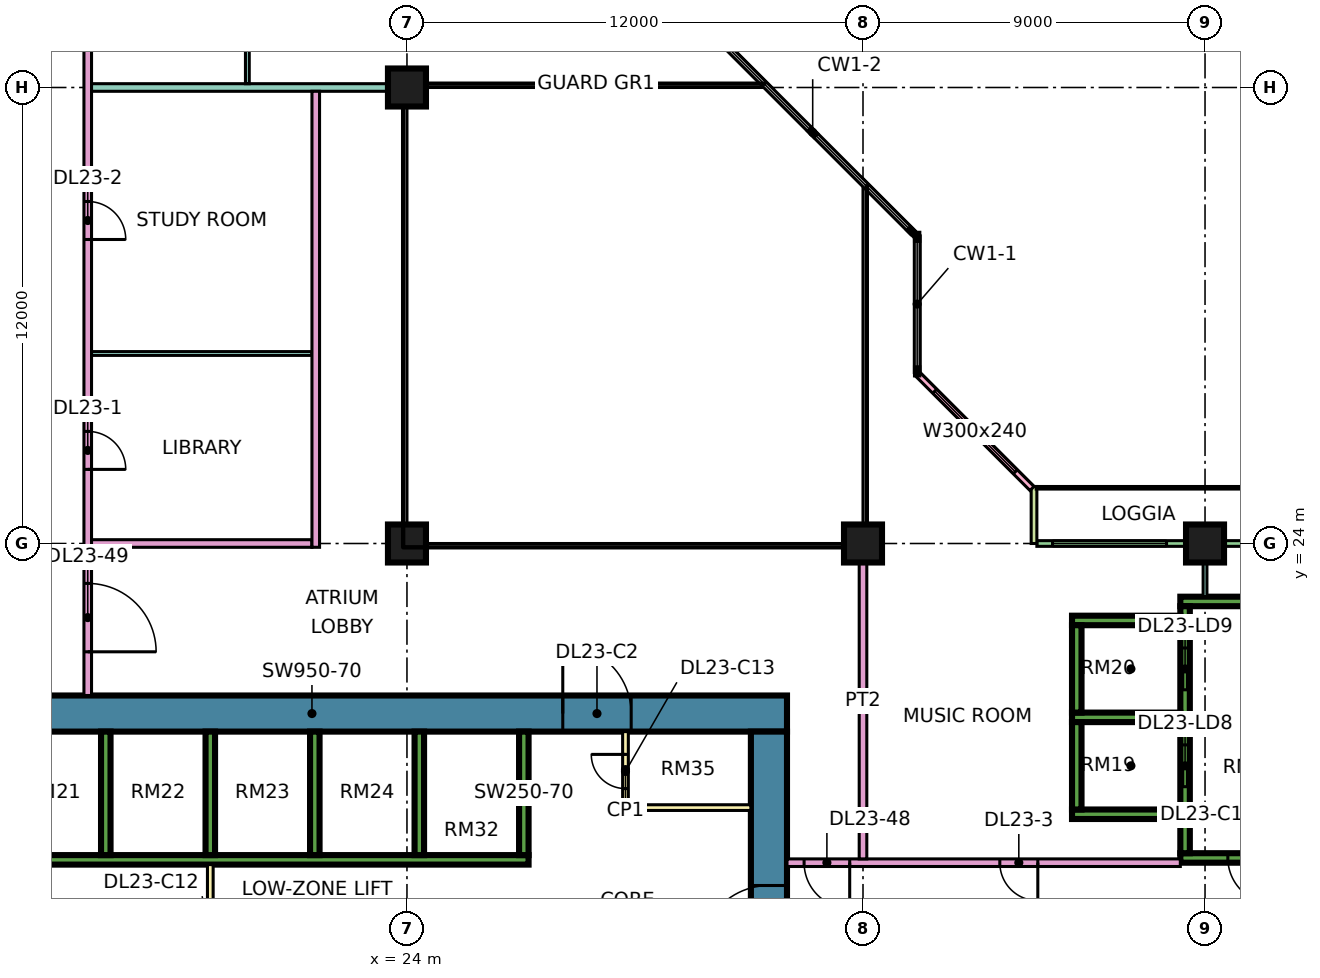
"""IFC4 building model, lengths in metres.
Left out: names, types, materials, properties, quantities, classifications, styles, units other than length and angle.
Written with IfcOpenShell. Run it as: python <this file> out.ifc"""

import sys

from ifc_helpers import new_model, si_unit, direction, frame, frame_2d, origin, origin_2d, place, context, subcontext, project, spatial, rectangle, extrude, element, fill, save


model = new_model("IFC4")
c1 = context("Model", 3, precision=1e-05, world=origin(), true_north=direction((0.0, 1.0)))
c2 = subcontext(c1, "Body", "Model", "MODEL_VIEW")
j1 = project(units=[si_unit("LENGTHUNIT", "METRE"), si_unit("PLANEANGLEUNIT", "RADIAN")], contexts=[c1])
p1 = place(None, origin())
s1 = spatial("IfcSite", under=j1, at=p1, CompositionType="ELEMENT")
p2 = place(p1, origin())
s2 = spatial("IfcBuilding", under=s1, at=p2, CompositionType="ELEMENT")
p3 = place(p2, frame((0.0, 0.0, 103.15)))
s3 = spatial("IfcBuildingStorey", under=s2, at=p3, CompositionType="ELEMENT", Elevation=103.15)
for number, where, z_axis, x_axis in (
    (1, (24.0, 24.0, 0.0), (0.0, 0.0, 1.0), (1.0, 0.0, 0.0)),
    (2, (24.0, 36.0, 0.0), (0.0, 0.0, 1.0), (1.0, 0.0, 0.0)),
    (3, (36.0, 24.0, 0.0), (0.0, 0.0, 1.0), (1.0, 0.0, 0.0)),
    (4, (45.0, 24.0, 0.0), (0.0, 0.0, 1.0), (1.0, 0.0, 0.0)),
):
    element("IfcColumn", number, at=place(p3, frame(where, z_axis=z_axis, x_axis=x_axis)), inside=s3, PredefinedType="COLUMN", context=c2, shape_type="SweptSolid", body=[
        extrude(rectangle(XDim=1.0, YDim=1.0, at=origin_2d()), origin(), (0.0, 0.0, 1.0), 3.75),
    ])
p4 = place(p3, frame((9.0, 19.525, 0.0), z_axis=(0.0, 0.0, 1.0), x_axis=(1.0, 0.0, 0.0)))
e5 = element("IfcWall", 5, at=p4, inside=s3, PredefinedType="SHEAR", context=c2, shape_type="SweptSolid", body=[
    extrude(rectangle(XDim=25.0, YDim=0.95, at=frame_2d((12.5, 0.0))), origin(), (0.0, 0.0, 1.0), 3.75),
])
p5 = place(p4, frame((19.1, 0.0, 0.0)))
e6 = element("IfcOpeningElement", 6, at=p5, cuts=e5, PredefinedType="OPENING", context=c2, shape_type="SweptSolid", body=[
    extrude(rectangle(XDim=1.8, YDim=2.4, at=frame_2d((0.9, 1.2))), frame((0.0, 0.485, 0.0), z_axis=(0.0, -1.0, 0.0), x_axis=(1.0, 0.0, 0.0)), (0.0, 0.0, 1.0), 0.97),
])
p6 = place(p3, frame((33.525, 7.95, 0.0), z_axis=(0.0, 0.0, 1.0), x_axis=(0.0, 1.0, 0.0)))
e7 = element("IfcWall", 7, at=p6, inside=s3, PredefinedType="SHEAR", context=c2, shape_type="SweptSolid", body=[
    extrude(rectangle(XDim=11.1, YDim=0.95, at=frame_2d((5.55, 0.0))), origin(), (0.0, 0.0, 1.0), 3.75),
])
p7 = place(p6, frame((5.25, 0.0, 0.0)))
e8 = element("IfcOpeningElement", 8, at=p7, cuts=e7, PredefinedType="OPENING", context=c2, shape_type="SweptSolid", body=[
    extrude(rectangle(XDim=1.8, YDim=2.4, at=frame_2d((0.9, 1.2))), frame((0.0, 0.485, 0.0), z_axis=(0.0, -1.0, 0.0), x_axis=(1.0, 0.0, 0.0)), (0.0, 0.0, 1.0), 0.97),
])
p8 = place(p3, frame((13.45, 15.675, 0.0), z_axis=(0.0, 0.0, 1.0), x_axis=(1.0, 0.0, 0.0)))
e9 = element("IfcWall", 9, at=p8, inside=s3, PredefinedType="SHEAR", context=c2, shape_type="SweptSolid", body=[
    extrude(rectangle(XDim=13.75, YDim=0.25, at=frame_2d((6.875, 0.0))), origin(), (0.0, 0.0, 1.0), 3.75),
])
for number, where, z_axis, x_axis in (
    (10, (16.075, 15.8, 0.0), (0.0, 0.0, 1.0), (0.0, 1.0, 0.0)),
    (11, (18.825, 15.8, 0.0), (0.0, 0.0, 1.0), (0.0, 1.0, 0.0)),
    (12, (21.575, 15.8, 0.0), (0.0, 0.0, 1.0), (0.0, 1.0, 0.0)),
    (13, (24.325, 15.8, 0.0), (0.0, 0.0, 1.0), (0.0, 1.0, 0.0)),
    (14, (27.075, 15.8, 0.0), (0.0, 0.0, 1.0), (0.0, 1.0, 0.0)),
):
    element("IfcWall", number, at=place(p3, frame(where, z_axis=z_axis, x_axis=x_axis)), inside=s3, PredefinedType="SHEAR", context=c2, shape_type="SweptSolid", body=[
        extrude(rectangle(XDim=3.25, YDim=0.25, at=frame_2d((1.625, 0.0))), origin(), (0.0, 0.0, 1.0), 3.75),
    ])
p9 = place(p3, frame((44.35, 15.725, 0.0), z_axis=(0.0, 0.0, 1.0), x_axis=(1.0, 0.0, 0.0)))
e15 = element("IfcWall", 15, at=p9, inside=s3, PredefinedType="SHEAR", context=c2, shape_type="SweptSolid", body=[
    extrude(rectangle(XDim=3.425, YDim=0.25, at=frame_2d((1.712, 0.0))), origin(), (0.0, 0.0, 1.0), 3.75),
])
p10 = place(p9, frame((1.25, 0.0, 0.0)))
e16 = element("IfcOpeningElement", 16, at=p10, cuts=e15, PredefinedType="OPENING", context=c2, shape_type="SweptSolid", body=[
    extrude(rectangle(XDim=1.2, YDim=2.2, at=frame_2d((0.6, 1.1))), frame((0.0, 0.135, 0.0), z_axis=(0.0, -1.0, 0.0), x_axis=(1.0, 0.0, 0.0)), (0.0, 0.0, 1.0), 0.27),
])
p11 = place(p3, frame((44.35, 22.475, 0.0), z_axis=(0.0, 0.0, 1.0), x_axis=(1.0, 0.0, 0.0)))
e17 = element("IfcWall", 17, at=p11, inside=s3, PredefinedType="SHEAR", context=c2, shape_type="SweptSolid", body=[
    extrude(rectangle(XDim=3.425, YDim=0.25, at=frame_2d((1.712, 0.0))), origin(), (0.0, 0.0, 1.0), 3.75),
])
p12 = place(p3, frame((44.475, 15.85, 0.0), z_axis=(0.0, 0.0, 1.0), x_axis=(0.0, 1.0, 0.0)))
e18 = element("IfcWall", 18, at=p12, inside=s3, PredefinedType="SHEAR", context=c2, shape_type="SweptSolid", body=[
    extrude(rectangle(XDim=6.5, YDim=0.25, at=frame_2d((3.25, 0.0))), origin(), (0.0, 0.0, 1.0), 3.75),
])
p13 = place(p12, frame((1.75, 0.0, 0.0)))
e19 = element("IfcOpeningElement", 19, at=p13, cuts=e18, PredefinedType="OPENING", context=c2, shape_type="SweptSolid", body=[
    extrude(rectangle(XDim=1.1, YDim=2.2, at=frame_2d((0.55, 1.1))), frame((0.0, 0.135, 0.0), z_axis=(0.0, -1.0, 0.0), x_axis=(1.0, 0.0, 0.0)), (0.0, 0.0, 1.0), 0.27),
])
p14 = place(p12, frame((4.3, 0.0, 0.0)))
e20 = element("IfcOpeningElement", 20, at=p14, cuts=e18, PredefinedType="OPENING", context=c2, shape_type="SweptSolid", body=[
    extrude(rectangle(XDim=1.1, YDim=2.2, at=frame_2d((0.55, 1.1))), frame((0.0, 0.135, 0.0), z_axis=(0.0, -1.0, 0.0), x_axis=(1.0, 0.0, 0.0)), (0.0, 0.0, 1.0), 0.27),
])
for number, where, z_axis, x_axis in (
    (21, (41.5, 16.875, 0.0), (0.0, 0.0, 1.0), (1.0, 0.0, 0.0)),
    (22, (41.5, 19.425, 0.0), (0.0, 0.0, 1.0), (1.0, 0.0, 0.0)),
    (23, (41.5, 21.975, 0.0), (0.0, 0.0, 1.0), (1.0, 0.0, 0.0)),
):
    element("IfcWall", number, at=place(p3, frame(where, z_axis=z_axis, x_axis=x_axis)), inside=s3, PredefinedType="SHEAR", context=c2, shape_type="SweptSolid", body=[
        extrude(rectangle(XDim=2.85, YDim=0.25, at=frame_2d((1.425, 0.0))), origin(), (0.0, 0.0, 1.0), 3.75),
    ])
for number, where, z_axis, x_axis in (
    (24, (41.625, 17.0, 0.0), (0.0, 0.0, 1.0), (0.0, 1.0, 0.0)),
    (25, (41.625, 19.55, 0.0), (0.0, 0.0, 1.0), (0.0, 1.0, 0.0)),
):
    element("IfcWall", number, at=place(p3, frame(where, z_axis=z_axis, x_axis=x_axis)), inside=s3, PredefinedType="SHEAR", context=c2, shape_type="SweptSolid", body=[
        extrude(rectangle(XDim=2.3, YDim=0.25, at=frame_2d((1.15, 0.0))), origin(), (0.0, 0.0, 1.0), 3.75),
    ])
p15 = place(p3, frame((47.925, 24.0, 0.0), z_axis=(0.0, 0.0, 1.0), x_axis=(-1.0, 0.0, 0.0)))
e26 = element("IfcWall", 26, at=p15, inside=s3, PredefinedType="SOLIDWALL", context=c2, shape_type="SweptSolid", body=[
    extrude(rectangle(XDim=7.35, YDim=0.15, at=frame_2d((3.675, 0.0))), origin(), (0.0, 0.0, 1.0), 3.35),
])
p16 = place(p15, frame((0.562, 0.0, 0.45)))
e27 = element("IfcOpeningElement", 27, at=p16, cuts=e26, PredefinedType="OPENING", context=c2, shape_type="SweptSolid", body=[
    extrude(rectangle(XDim=1.2, YDim=2.4, at=frame_2d((0.6, 1.2))), frame((0.0, 0.085, 0.0), z_axis=(0.0, -1.0, 0.0), x_axis=(1.0, 0.0, 0.0)), (0.0, 0.0, 1.0), 0.17),
])
p17 = place(p15, frame((3.938, 0.0, 0.45)))
e28 = element("IfcOpeningElement", 28, at=p17, cuts=e26, PredefinedType="OPENING", context=c2, shape_type="SweptSolid", body=[
    extrude(rectangle(XDim=3.0, YDim=2.4, at=frame_2d((1.5, 1.2))), frame((0.0, 0.085, 0.0), z_axis=(0.0, -1.0, 0.0), x_axis=(1.0, 0.0, 0.0)), (0.0, 0.0, 1.0), 0.17),
])
p18 = place(p3, frame((40.5, 25.5, 0.0), z_axis=(0.0, 0.0, 1.0), x_axis=(0.0, -1.0, 0.0)))
e29 = element("IfcWall", 29, at=p18, inside=s3, PredefinedType="SOLIDWALL", context=c2, shape_type="SweptSolid", body=[
    extrude(rectangle(XDim=1.5, YDim=0.15, at=frame_2d((0.75, 0.0))), origin(), (0.0, 0.0, 1.0), 3.35),
])
p19 = place(p3, frame((40.447, 25.447, 0.0), z_axis=(0.0, 0.0, 1.0), x_axis=(-0.707106781187, 0.707106781187, 0.0)))
e30 = element("IfcWall", 30, at=p19, inside=s3, PredefinedType="SOLIDWALL", context=c2, shape_type="SweptSolid", body=[
    extrude(rectangle(XDim=4.243, YDim=0.15, at=frame_2d((2.121, 0.0))), origin(), (0.0, 0.0, 1.0), 3.35),
])
p20 = place(p19, frame((0.621, 0.0, 0.45)))
e31 = element("IfcOpeningElement", 31, at=p20, cuts=e30, PredefinedType="OPENING", context=c2, shape_type="SweptSolid", body=[
    extrude(rectangle(XDim=3.0, YDim=2.4, at=frame_2d((1.5, 1.2))), frame((0.0, 0.085, 0.0), z_axis=(0.0, -1.0, 0.0), x_axis=(1.0, 0.0, 0.0)), (0.0, 0.0, 1.0), 0.17),
])
p21 = place(p3, frame((18.825, 11.45, 0.0), z_axis=(0.0, 0.0, 1.0), x_axis=(0.0, 1.0, 0.0)))
e32 = element("IfcWall", 32, at=p21, inside=s3, PredefinedType="PARTITIONING", context=c2, shape_type="SweptSolid", body=[
    extrude(rectangle(XDim=4.1, YDim=0.15, at=frame_2d((2.05, 0.0))), origin(), (0.0, 0.0, 1.0), 3.35),
])
p22 = place(p21, frame((1.15, 0.0, 0.0)))
e33 = element("IfcOpeningElement", 33, at=p22, cuts=e32, PredefinedType="OPENING", context=c2, shape_type="SweptSolid", body=[
    extrude(rectangle(XDim=1.8, YDim=2.4, at=frame_2d((0.9, 1.2))), frame((0.0, 0.085, 0.0), z_axis=(0.0, -1.0, 0.0), x_axis=(1.0, 0.0, 0.0)), (0.0, 0.0, 1.0), 0.17),
])
p23 = place(p3, frame((29.75, 17.05, 0.0), z_axis=(0.0, 0.0, 1.0), x_axis=(0.0, 1.0, 0.0)))
e34 = element("IfcWall", 34, at=p23, inside=s3, PredefinedType="PARTITIONING", context=c2, shape_type="SweptSolid", body=[
    extrude(rectangle(XDim=2.0, YDim=0.15, at=frame_2d((1.0, 0.0))), origin(), (0.0, 0.0, 1.0), 3.35),
])
p24 = place(p23, frame((0.5, 0.0, 0.0)))
e35 = element("IfcOpeningElement", 35, at=p24, cuts=e34, PredefinedType="OPENING", context=c2, shape_type="SweptSolid", body=[
    extrude(rectangle(XDim=0.9, YDim=2.1, at=frame_2d((0.45, 1.05))), frame((0.0, 0.085, 0.0), z_axis=(0.0, -1.0, 0.0), x_axis=(1.0, 0.0, 0.0)), (0.0, 0.0, 1.0), 0.17),
])
p25 = place(p3, frame((29.75, 17.05, 0.0), z_axis=(0.0, 0.0, 1.0), x_axis=(1.0, 0.0, 0.0)))
e36 = element("IfcWall", 36, at=p25, inside=s3, PredefinedType="PARTITIONING", context=c2, shape_type="SweptSolid", body=[
    extrude(rectangle(XDim=3.3, YDim=0.15, at=frame_2d((1.65, 0.0))), origin(), (0.0, 0.0, 1.0), 3.35),
])
p26 = place(p3, frame((15.6, 20.0, 0.0), z_axis=(0.0, 0.0, 1.0), x_axis=(0.0, 1.0, 0.0)))
e37 = element("IfcWall", 37, at=p26, inside=s3, PredefinedType="PARTITIONING", context=c2, shape_type="SweptSolid", body=[
    extrude(rectangle(XDim=27.775, YDim=0.2, at=frame_2d((13.887, 0.0))), origin(), (0.0, 0.0, 1.0), 3.35),
])
p27 = place(p26, frame((5.95, 0.0, 0.0)))
e38 = element("IfcOpeningElement", 38, at=p27, cuts=e37, PredefinedType="OPENING", context=c2, shape_type="SweptSolid", body=[
    extrude(rectangle(XDim=1.0, YDim=2.1, at=frame_2d((0.5, 1.05))), frame((0.0, 0.11, 0.0), z_axis=(0.0, -1.0, 0.0), x_axis=(1.0, 0.0, 0.0)), (0.0, 0.0, 1.0), 0.22),
])
p28 = place(p26, frame((12.0, 0.0, 0.0)))
e39 = element("IfcOpeningElement", 39, at=p28, cuts=e37, PredefinedType="OPENING", context=c2, shape_type="SweptSolid", body=[
    extrude(rectangle(XDim=1.0, YDim=2.1, at=frame_2d((0.5, 1.05))), frame((0.0, 0.11, 0.0), z_axis=(0.0, -1.0, 0.0), x_axis=(1.0, 0.0, 0.0)), (0.0, 0.0, 1.0), 0.22),
])
p29 = place(p26, frame((17.05, 0.0, 0.0)))
e40 = element("IfcOpeningElement", 40, at=p29, cuts=e37, PredefinedType="OPENING", context=c2, shape_type="SweptSolid", body=[
    extrude(rectangle(XDim=1.0, YDim=2.1, at=frame_2d((0.5, 1.05))), frame((0.0, 0.11, 0.0), z_axis=(0.0, -1.0, 0.0), x_axis=(1.0, 0.0, 0.0)), (0.0, 0.0, 1.0), 0.22),
])
p30 = place(p26, frame((1.15, 0.0, 0.0)))
e41 = element("IfcOpeningElement", 41, at=p30, cuts=e37, PredefinedType="OPENING", context=c2, shape_type="SweptSolid", body=[
    extrude(rectangle(XDim=1.8, YDim=2.1, at=frame_2d((0.9, 1.05))), frame((0.0, 0.11, 0.0), z_axis=(0.0, -1.0, 0.0), x_axis=(1.0, 0.0, 0.0)), (0.0, 0.0, 1.0), 0.22),
])
p31 = place(p26, frame((25.9, 0.0, 0.0)))
e42 = element("IfcOpeningElement", 42, at=p31, cuts=e37, PredefinedType="OPENING", context=c2, shape_type="SweptSolid", body=[
    extrude(rectangle(XDim=1.0, YDim=2.1, at=frame_2d((0.5, 1.05))), frame((0.0, 0.11, 0.0), z_axis=(0.0, -1.0, 0.0), x_axis=(1.0, 0.0, 0.0)), (0.0, 0.0, 1.0), 0.22),
])
p32 = place(p3, frame((15.7, 24.0, 0.0), z_axis=(0.0, 0.0, 1.0), x_axis=(1.0, 0.0, 0.0)))
e43 = element("IfcWall", 43, at=p32, inside=s3, PredefinedType="PARTITIONING", context=c2, shape_type="SweptSolid", body=[
    extrude(rectangle(XDim=5.8, YDim=0.2, at=frame_2d((2.9, 0.0))), origin(), (0.0, 0.0, 1.0), 3.35),
])
p33 = place(p3, frame((15.7, 29.0, 0.0), z_axis=(0.0, 0.0, 1.0), x_axis=(1.0, 0.0, 0.0)))
e44 = element("IfcWall", 44, at=p33, inside=s3, PredefinedType="PARTITIONING", context=c2, shape_type="SweptSolid", body=[
    extrude(rectangle(XDim=5.8, YDim=0.1, at=frame_2d((2.9, 0.0))), origin(), (0.0, 0.0, 1.0), 3.35),
])
p34 = place(p3, frame((15.7, 36.0, 0.0), z_axis=(0.0, 0.0, 1.0), x_axis=(1.0, 0.0, 0.0)))
e45 = element("IfcWall", 45, at=p34, inside=s3, PredefinedType="PARTITIONING", context=c2, shape_type="SweptSolid", body=[
    extrude(rectangle(XDim=8.3, YDim=0.2, at=frame_2d((4.15, 0.0))), origin(), (0.0, 0.0, 1.0), 3.35),
])
p35 = place(p3, frame((19.8, 36.1, 0.0), z_axis=(0.0, 0.0, 1.0), x_axis=(0.0, 1.0, 0.0)))
e46 = element("IfcWall", 46, at=p35, inside=s3, PredefinedType="PARTITIONING", context=c2, shape_type="SweptSolid", body=[
    extrude(rectangle(XDim=5.95, YDim=0.1, at=frame_2d((2.975, 0.0))), origin(), (0.0, 0.0, 1.0), 3.35),
])
p36 = place(p35, frame((0.95, 0.0, 0.0)))
e47 = element("IfcOpeningElement", 47, at=p36, cuts=e46, PredefinedType="OPENING", context=c2, shape_type="SweptSolid", body=[
    extrude(rectangle(XDim=0.9, YDim=2.1, at=frame_2d((0.45, 1.05))), frame((0.0, 0.06, 0.0), z_axis=(0.0, -1.0, 0.0), x_axis=(1.0, 0.0, 0.0)), (0.0, 0.0, 1.0), 0.12),
])
p37 = place(p3, frame((21.6, 23.9, 0.0), z_axis=(0.0, 0.0, 1.0), x_axis=(0.0, 1.0, 0.0)))
e48 = element("IfcWall", 48, at=p37, inside=s3, PredefinedType="PARTITIONING", context=c2, shape_type="SweptSolid", body=[
    extrude(rectangle(XDim=12.0, YDim=0.2, at=frame_2d((6.0, 0.0))), origin(), (0.0, 0.0, 1.0), 3.35),
])
p38 = place(p3, frame((34.0, 15.6, 0.0), z_axis=(0.0, 0.0, 1.0), x_axis=(1.0, 0.0, 0.0)))
e49 = element("IfcWall", 49, at=p38, inside=s3, PredefinedType="PARTITIONING", context=c2, shape_type="SweptSolid", body=[
    extrude(rectangle(XDim=10.35, YDim=0.2, at=frame_2d((5.175, 0.0))), origin(), (0.0, 0.0, 1.0), 3.35),
])
p39 = place(p38, frame((5.6, 0.0, 0.0)))
e50 = element("IfcOpeningElement", 50, at=p39, cuts=e49, PredefinedType="OPENING", context=c2, shape_type="SweptSolid", body=[
    extrude(rectangle(XDim=1.0, YDim=2.1, at=frame_2d((0.5, 1.05))), frame((0.0, 0.11, 0.0), z_axis=(0.0, -1.0, 0.0), x_axis=(1.0, 0.0, 0.0)), (0.0, 0.0, 1.0), 0.22),
])
p40 = place(p38, frame((0.45, 0.0, 0.0)))
e51 = element("IfcOpeningElement", 51, at=p40, cuts=e49, PredefinedType="OPENING", context=c2, shape_type="SweptSolid", body=[
    extrude(rectangle(XDim=1.2, YDim=2.1, at=frame_2d((0.6, 1.05))), frame((0.0, 0.11, 0.0), z_axis=(0.0, -1.0, 0.0), x_axis=(1.0, 0.0, 0.0)), (0.0, 0.0, 1.0), 0.22),
])
p41 = place(p3, frame((36.0, 15.7, 0.0), z_axis=(0.0, 0.0, 1.0), x_axis=(0.0, 1.0, 0.0)))
e52 = element("IfcWall", 52, at=p41, inside=s3, PredefinedType="PARTITIONING", context=c2, shape_type="SweptSolid", body=[
    extrude(rectangle(XDim=8.3, YDim=0.2, at=frame_2d((4.15, 0.0))), origin(), (0.0, 0.0, 1.0), 3.35),
])
p42 = place(p3, frame((45.0, 22.6, 0.0), z_axis=(0.0, 0.0, 1.0), x_axis=(0.0, 1.0, 0.0)))
e53 = element("IfcWall", 53, at=p42, inside=s3, PredefinedType="PARTITIONING", context=c2, shape_type="SweptSolid", body=[
    extrude(rectangle(XDim=1.326, YDim=0.1, at=frame_2d((0.663, 0.0))), origin(), (0.0, 0.0, 1.0), 3.35),
])
p43 = place(p17, origin())
e54 = element("IfcWindow", 54, at=p43, inside=s3, PartitioningType="SINGLE_PANEL", PredefinedType="WINDOW", context=c2, shape_type="SweptSolid", body=[
    extrude(rectangle(XDim=3.0, YDim=2.4, at=frame_2d((1.5, 1.2))), frame((0.0, 0.03, 0.0), z_axis=(0.0, -1.0, 0.0), x_axis=(1.0, 0.0, 0.0)), (0.0, 0.0, 1.0), 0.06),
])
fill(e28, e54)
p44 = place(p20, origin())
e55 = element("IfcWindow", 55, at=p44, inside=s3, PartitioningType="SINGLE_PANEL", PredefinedType="WINDOW", context=c2, shape_type="SweptSolid", body=[
    extrude(rectangle(XDim=3.0, YDim=2.4, at=frame_2d((1.5, 1.2))), frame((0.0, 0.03, 0.0), z_axis=(0.0, -1.0, 0.0), x_axis=(1.0, 0.0, 0.0)), (0.0, 0.0, 1.0), 0.06),
])
fill(e31, e55)
p45 = place(p7, origin())
e56 = element("IfcDoor", 56, at=p45, inside=s3, OperationType="DOUBLE_DOOR_SINGLE_SWING", PredefinedType="DOOR", context=c2, shape_type="SweptSolid", body=[
    extrude(rectangle(XDim=1.8, YDim=2.4, at=frame_2d((0.9, 1.2))), frame((0.0, 0.025, 0.0), z_axis=(0.0, -1.0, 0.0), x_axis=(1.0, 0.0, 0.0)), (0.0, 0.0, 1.0), 0.05),
])
fill(e8, e56)
p46 = place(p5, origin())
e57 = element("IfcDoor", 57, at=p46, inside=s3, OperationType="DOUBLE_DOOR_SINGLE_SWING", PredefinedType="DOOR", context=c2, shape_type="SweptSolid", body=[
    extrude(rectangle(XDim=1.8, YDim=2.4, at=frame_2d((0.9, 1.2))), frame((0.0, 0.025, 0.0), z_axis=(0.0, -1.0, 0.0), x_axis=(1.0, 0.0, 0.0)), (0.0, 0.0, 1.0), 0.05),
])
fill(e6, e57)
p47 = place(p10, origin())
e58 = element("IfcDoor", 58, at=p47, inside=s3, OperationType="SINGLE_SWING_RIGHT", PredefinedType="DOOR", context=c2, shape_type="SweptSolid", body=[
    extrude(rectangle(XDim=1.2, YDim=2.2, at=frame_2d((0.6, 1.1))), frame((0.0, 0.025, 0.0), z_axis=(0.0, -1.0, 0.0), x_axis=(1.0, 0.0, 0.0)), (0.0, 0.0, 1.0), 0.05),
])
fill(e16, e58)
p48 = place(p13, origin())
e59 = element("IfcDoor", 59, at=p48, inside=s3, OperationType="DOUBLE_DOOR_SLIDING", PredefinedType="DOOR", context=c2, shape_type="SweptSolid", body=[
    extrude(rectangle(XDim=1.1, YDim=2.2, at=frame_2d((0.55, 1.1))), frame((0.0, 0.025, 0.0), z_axis=(0.0, -1.0, 0.0), x_axis=(1.0, 0.0, 0.0)), (0.0, 0.0, 1.0), 0.05),
])
fill(e19, e59)
p49 = place(p14, origin())
e60 = element("IfcDoor", 60, at=p49, inside=s3, OperationType="DOUBLE_DOOR_SLIDING", PredefinedType="DOOR", context=c2, shape_type="SweptSolid", body=[
    extrude(rectangle(XDim=1.1, YDim=2.2, at=frame_2d((0.55, 1.1))), frame((0.0, 0.025, 0.0), z_axis=(0.0, -1.0, 0.0), x_axis=(1.0, 0.0, 0.0)), (0.0, 0.0, 1.0), 0.05),
])
fill(e20, e60)
p50 = place(p24, frame((0.9, 0.0, 0.0), z_axis=(0.0, 0.0, 1.0), x_axis=(-1.0, 0.0, 0.0)))
e61 = element("IfcDoor", 61, at=p50, inside=s3, OperationType="SINGLE_SWING_RIGHT", PredefinedType="DOOR", context=c2, shape_type="SweptSolid", body=[
    extrude(rectangle(XDim=0.9, YDim=2.1, at=frame_2d((0.45, 1.05))), frame((0.0, 0.025, 0.0), z_axis=(0.0, -1.0, 0.0), x_axis=(1.0, 0.0, 0.0)), (0.0, 0.0, 1.0), 0.05),
])
fill(e35, e61)
p51 = place(p27, frame((1.0, 0.0, 0.0), z_axis=(0.0, 0.0, 1.0), x_axis=(-1.0, 0.0, 0.0)))
e62 = element("IfcDoor", 62, at=p51, inside=s3, OperationType="SINGLE_SWING_LEFT", PredefinedType="DOOR", context=c2, shape_type="SweptSolid", body=[
    extrude(rectangle(XDim=1.0, YDim=2.1, at=frame_2d((0.5, 1.05))), frame((0.0, 0.025, 0.0), z_axis=(0.0, -1.0, 0.0), x_axis=(1.0, 0.0, 0.0)), (0.0, 0.0, 1.0), 0.05),
])
fill(e38, e62)
p52 = place(p28, frame((1.0, 0.0, 0.0), z_axis=(0.0, 0.0, 1.0), x_axis=(-1.0, 0.0, 0.0)))
e63 = element("IfcDoor", 63, at=p52, inside=s3, OperationType="SINGLE_SWING_LEFT", PredefinedType="DOOR", context=c2, shape_type="SweptSolid", body=[
    extrude(rectangle(XDim=1.0, YDim=2.1, at=frame_2d((0.5, 1.05))), frame((0.0, 0.025, 0.0), z_axis=(0.0, -1.0, 0.0), x_axis=(1.0, 0.0, 0.0)), (0.0, 0.0, 1.0), 0.05),
])
fill(e39, e63)
p53 = place(p39, origin())
e64 = element("IfcDoor", 64, at=p53, inside=s3, OperationType="SINGLE_SWING_RIGHT", PredefinedType="DOOR", context=c2, shape_type="SweptSolid", body=[
    extrude(rectangle(XDim=1.0, YDim=2.1, at=frame_2d((0.5, 1.05))), frame((0.0, 0.025, 0.0), z_axis=(0.0, -1.0, 0.0), x_axis=(1.0, 0.0, 0.0)), (0.0, 0.0, 1.0), 0.05),
])
fill(e50, e64)
p54 = place(p40, origin())
e65 = element("IfcDoor", 65, at=p54, inside=s3, OperationType="SINGLE_SWING_RIGHT", PredefinedType="DOOR", context=c2, shape_type="SweptSolid", body=[
    extrude(rectangle(XDim=1.2, YDim=2.1, at=frame_2d((0.6, 1.05))), frame((0.0, 0.025, 0.0), z_axis=(0.0, -1.0, 0.0), x_axis=(1.0, 0.0, 0.0)), (0.0, 0.0, 1.0), 0.05),
])
fill(e51, e65)
p55 = place(p30, frame((1.8, 0.0, 0.0), z_axis=(0.0, 0.0, 1.0), x_axis=(-1.0, 0.0, 0.0)))
e66 = element("IfcDoor", 66, at=p55, inside=s3, OperationType="DOUBLE_DOOR_SINGLE_SWING", PredefinedType="DOOR", context=c2, shape_type="SweptSolid", body=[
    extrude(rectangle(XDim=1.8, YDim=2.1, at=frame_2d((0.9, 1.05))), frame((0.0, 0.025, 0.0), z_axis=(0.0, -1.0, 0.0), x_axis=(1.0, 0.0, 0.0)), (0.0, 0.0, 1.0), 0.05),
])
fill(e41, e66)
save(model, sys.argv[1])
